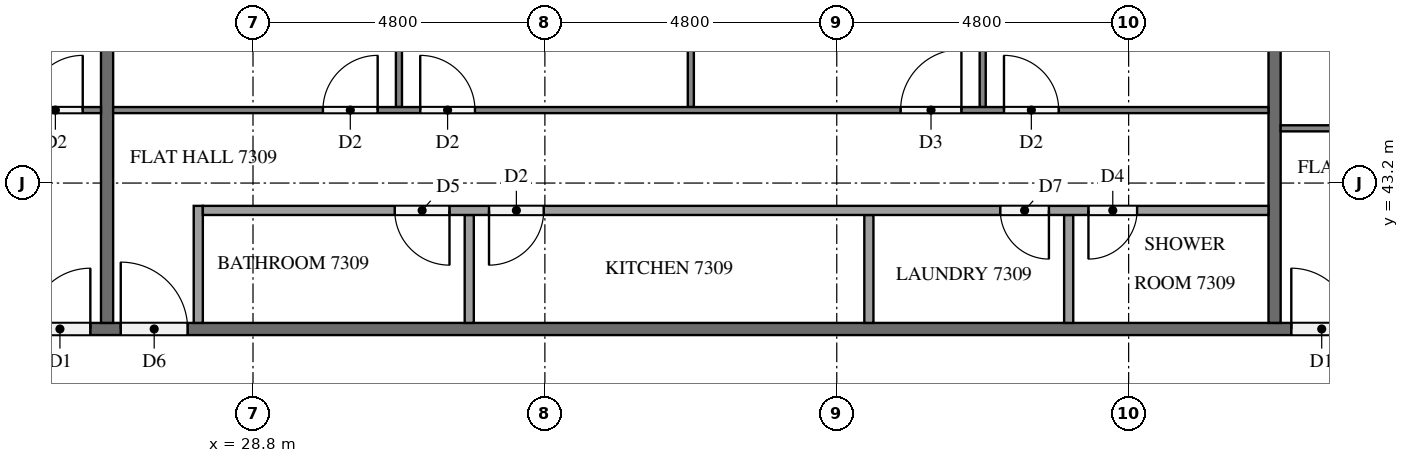
"""IFC4 building model, lengths in metres.
Left out: names, types, materials, properties, quantities, classifications, styles, units other than length and angle.
Written with IfcOpenShell. Run it as: python <this file> out.ifc"""

import sys

from ifc_helpers import new_model, si_unit, direction, frame, frame_2d, origin, place, context, subcontext, project, spatial, rectangle, extrude, element, fill, save


model = new_model("IFC4")
c1 = context("Model", 3, precision=1e-05, world=origin(), true_north=direction((0.0, 1.0)))
c2 = subcontext(c1, "Body", "Model", "MODEL_VIEW")
j1 = project(units=[si_unit("LENGTHUNIT", "METRE"), si_unit("PLANEANGLEUNIT", "RADIAN")], contexts=[c1])
p1 = place(None, origin())
s1 = spatial("IfcSite", under=j1, at=p1, CompositionType="ELEMENT")
p2 = place(p1, origin())
s2 = spatial("IfcBuilding", under=s1, at=p2, CompositionType="ELEMENT")
p3 = place(p2, frame((0.0, 0.0, 279.1)))
s3 = spatial("IfcBuildingStorey", under=s2, at=p3, CompositionType="ELEMENT", Elevation=279.1)
p4 = place(p3, frame((11.9, 40.8, 0.0), z_axis=(0.0, 0.0, 1.0), x_axis=(1.0, 0.0, 0.0)))
e1 = element("IfcWall", 1, at=p4, inside=s3, PredefinedType="PARTITIONING", context=c2, shape_type="SweptSolid", body=[
    extrude(rectangle(XDim=38.6, YDim=0.2, at=frame_2d((19.3, 0.0))), origin(), (0.0, 0.0, 1.0), 3.2),
])
p5 = place(p4, frame((33.975, 0.0, 0.0)))
e2 = element("IfcOpeningElement", 2, at=p5, cuts=e1, PredefinedType="OPENING", context=c2, shape_type="SweptSolid", body=[
    extrude(rectangle(XDim=1.0, YDim=2.1, at=frame_2d((0.5, 1.05))), frame((0.0, 0.11, 0.0), z_axis=(0.0, -1.0, 0.0), x_axis=(1.0, 0.0, 0.0)), (0.0, 0.0, 1.0), 0.22),
])
p6 = place(p4, frame((14.725, 0.0, 0.0)))
e3 = element("IfcOpeningElement", 3, at=p6, cuts=e1, PredefinedType="OPENING", context=c2, shape_type="SweptSolid", body=[
    extrude(rectangle(XDim=1.1, YDim=2.1, at=frame_2d((0.55, 1.05))), frame((0.0, 0.11, 0.0), z_axis=(0.0, -1.0, 0.0), x_axis=(1.0, 0.0, 0.0)), (0.0, 0.0, 1.0), 0.22),
])
p7 = place(p4, frame((13.225, 0.0, 0.0)))
e4 = element("IfcOpeningElement", 4, at=p7, cuts=e1, PredefinedType="OPENING", context=c2, shape_type="SweptSolid", body=[
    extrude(rectangle(XDim=1.0, YDim=2.1, at=frame_2d((0.5, 1.05))), frame((0.0, 0.11, 0.0), z_axis=(0.0, -1.0, 0.0), x_axis=(1.0, 0.0, 0.0)), (0.0, 0.0, 1.0), 0.22),
])
p8 = place(p4, frame((1.225, 0.0, 0.0)))
e5 = element("IfcOpeningElement", 5, at=p8, cuts=e1, PredefinedType="OPENING", context=c2, shape_type="SweptSolid", body=[
    extrude(rectangle(XDim=1.0, YDim=2.1, at=frame_2d((0.5, 1.05))), frame((0.0, 0.11, 0.0), z_axis=(0.0, -1.0, 0.0), x_axis=(1.0, 0.0, 0.0)), (0.0, 0.0, 1.0), 0.22),
])
for number, where, z_axis, x_axis in (
    (6, (45.6, 47.9, 0.0), (0.0, 0.0, 1.0), (0.0, -1.0, 0.0)),
    (7, (26.4, 47.9, 0.0), (0.0, 0.0, 1.0), (0.0, -1.0, 0.0)),
):
    element("IfcWall", number, at=place(p3, frame(where, z_axis=z_axis, x_axis=x_axis)), inside=s3, PredefinedType="PARTITIONING", context=c2, shape_type="SweptSolid", body=[
        extrude(rectangle(XDim=7.0, YDim=0.2, at=frame_2d((3.5, 0.0))), origin(), (0.0, 0.0, 1.0), 3.2),
    ])
p9 = place(p3, frame((45.7, 44.1, 0.0), z_axis=(0.0, 0.0, 1.0), x_axis=(1.0, 0.0, 0.0)))
e8 = element("IfcWall", 8, at=p9, inside=s3, PredefinedType="PARTITIONING", context=c2, shape_type="SweptSolid", body=[
    extrude(rectangle(XDim=11.559, YDim=0.1, at=frame_2d((5.779, 0.0))), origin(), (0.0, 0.0, 1.0), 3.2),
])
p10 = place(p9, frame((3.45, 0.0, 0.0)))
e9 = element("IfcOpeningElement", 9, at=p10, cuts=e8, PredefinedType="OPENING", context=c2, shape_type="SweptSolid", body=[
    extrude(rectangle(XDim=0.9, YDim=2.1, at=frame_2d((0.45, 1.05))), frame((0.0, 0.06, 0.0), z_axis=(0.0, -1.0, 0.0), x_axis=(1.0, 0.0, 0.0)), (0.0, 0.0, 1.0), 0.12),
])
p11 = place(p9, frame((5.05, 0.0, 0.0)))
e10 = element("IfcOpeningElement", 10, at=p11, cuts=e8, PredefinedType="OPENING", context=c2, shape_type="SweptSolid", body=[
    extrude(rectangle(XDim=1.0, YDim=2.1, at=frame_2d((0.5, 1.05))), frame((0.0, 0.06, 0.0), z_axis=(0.0, -1.0, 0.0), x_axis=(1.0, 0.0, 0.0)), (0.0, 0.0, 1.0), 0.12),
])
for number, where, z_axis, x_axis in (
    (11, (31.2, 44.45, 0.0), (0.0, 0.0, 1.0), (0.0, 1.0, 0.0)),
    (12, (36.0, 44.45, 0.0), (0.0, 0.0, 1.0), (0.0, 1.0, 0.0)),
    (13, (40.8, 44.45, 0.0), (0.0, 0.0, 1.0), (0.0, 1.0, 0.0)),
):
    element("IfcWall", number, at=place(p3, frame(where, z_axis=z_axis, x_axis=x_axis)), inside=s3, PredefinedType="PARTITIONING", context=c2, shape_type="SweptSolid", body=[
        extrude(rectangle(XDim=3.45, YDim=0.1, at=frame_2d((1.725, 0.0))), origin(), (0.0, 0.0, 1.0), 3.2),
    ])
p12 = place(p3, frame((26.5, 44.4, 0.0), z_axis=(0.0, 0.0, 1.0), x_axis=(1.0, 0.0, 0.0)))
e14 = element("IfcWall", 14, at=p12, inside=s3, PredefinedType="PARTITIONING", context=c2, shape_type="SweptSolid", body=[
    extrude(rectangle(XDim=19.0, YDim=0.1, at=frame_2d((9.5, 0.0))), origin(), (0.0, 0.0, 1.0), 3.2),
])
p13 = place(p12, frame((3.45, 0.0, 0.0)))
e15 = element("IfcOpeningElement", 15, at=p13, cuts=e14, PredefinedType="OPENING", context=c2, shape_type="SweptSolid", body=[
    extrude(rectangle(XDim=0.9, YDim=2.1, at=frame_2d((0.45, 1.05))), frame((0.0, 0.06, 0.0), z_axis=(0.0, -1.0, 0.0), x_axis=(1.0, 0.0, 0.0)), (0.0, 0.0, 1.0), 0.12),
])
p14 = place(p12, frame((5.05, 0.0, 0.0)))
e16 = element("IfcOpeningElement", 16, at=p14, cuts=e14, PredefinedType="OPENING", context=c2, shape_type="SweptSolid", body=[
    extrude(rectangle(XDim=0.9, YDim=2.1, at=frame_2d((0.45, 1.05))), frame((0.0, 0.06, 0.0), z_axis=(0.0, -1.0, 0.0), x_axis=(1.0, 0.0, 0.0)), (0.0, 0.0, 1.0), 0.12),
])
p15 = place(p12, frame((12.95, 0.0, 0.0)))
e17 = element("IfcOpeningElement", 17, at=p15, cuts=e14, PredefinedType="OPENING", context=c2, shape_type="SweptSolid", body=[
    extrude(rectangle(XDim=1.0, YDim=2.1, at=frame_2d((0.5, 1.05))), frame((0.0, 0.06, 0.0), z_axis=(0.0, -1.0, 0.0), x_axis=(1.0, 0.0, 0.0)), (0.0, 0.0, 1.0), 0.12),
])
p16 = place(p12, frame((14.65, 0.0, 0.0)))
e18 = element("IfcOpeningElement", 18, at=p16, cuts=e14, PredefinedType="OPENING", context=c2, shape_type="SweptSolid", body=[
    extrude(rectangle(XDim=0.9, YDim=2.1, at=frame_2d((0.45, 1.05))), frame((0.0, 0.06, 0.0), z_axis=(0.0, -1.0, 0.0), x_axis=(1.0, 0.0, 0.0)), (0.0, 0.0, 1.0), 0.12),
])
for number, where, z_axis, x_axis in (
    (19, (32.356, 40.9, 0.0), (0.0, 0.0, 1.0), (0.0, 1.0, 0.0)),
    (20, (38.928, 40.9, 0.0), (0.0, 0.0, 1.0), (0.0, 1.0, 0.0)),
    (21, (42.214, 40.9, 0.0), (0.0, 0.0, 1.0), (0.0, 1.0, 0.0)),
):
    element("IfcWall", number, at=place(p3, frame(where, z_axis=z_axis, x_axis=x_axis)), inside=s3, PredefinedType="PARTITIONING", context=c2, shape_type="SweptSolid", body=[
        extrude(rectangle(XDim=1.775, YDim=0.15, at=frame_2d((0.888, 0.0))), origin(), (0.0, 0.0, 1.0), 3.2),
    ])
p17 = place(p3, frame((27.9, 40.9, 0.0), z_axis=(0.0, 0.0, 1.0), x_axis=(0.0, 1.0, 0.0)))
e22 = element("IfcWall", 22, at=p17, inside=s3, PredefinedType="PARTITIONING", context=c2, shape_type="SweptSolid", body=[
    extrude(rectangle(XDim=1.925, YDim=0.15, at=frame_2d((0.962, 0.0))), origin(), (0.0, 0.0, 1.0), 3.2),
])
p18 = place(p3, frame((45.5, 42.75, 0.0), z_axis=(0.0, 0.0, 1.0), x_axis=(-1.0, 0.0, 0.0)))
e23 = element("IfcWall", 23, at=p18, inside=s3, PredefinedType="PARTITIONING", context=c2, shape_type="SweptSolid", body=[
    extrude(rectangle(XDim=17.525, YDim=0.15, at=frame_2d((8.762, 0.0))), origin(), (0.0, 0.0, 1.0), 3.2),
])
p19 = place(p18, frame((13.469, 0.0, 0.0)))
e24 = element("IfcOpeningElement", 24, at=p19, cuts=e23, PredefinedType="OPENING", context=c2, shape_type="SweptSolid", body=[
    extrude(rectangle(XDim=0.9, YDim=2.1, at=frame_2d((0.45, 1.05))), frame((0.0, 0.085, 0.0), z_axis=(0.0, -1.0, 0.0), x_axis=(1.0, 0.0, 0.0)), (0.0, 0.0, 1.0), 0.17),
])
p20 = place(p18, frame((11.919, 0.0, 0.0)))
e25 = element("IfcOpeningElement", 25, at=p20, cuts=e23, PredefinedType="OPENING", context=c2, shape_type="SweptSolid", body=[
    extrude(rectangle(XDim=0.9, YDim=2.1, at=frame_2d((0.45, 1.05))), frame((0.0, 0.085, 0.0), z_axis=(0.0, -1.0, 0.0), x_axis=(1.0, 0.0, 0.0)), (0.0, 0.0, 1.0), 0.17),
])
p21 = place(p18, frame((3.611, 0.0, 0.0)))
e26 = element("IfcOpeningElement", 26, at=p21, cuts=e23, PredefinedType="OPENING", context=c2, shape_type="SweptSolid", body=[
    extrude(rectangle(XDim=0.8, YDim=2.1, at=frame_2d((0.4, 1.05))), frame((0.0, 0.085, 0.0), z_axis=(0.0, -1.0, 0.0), x_axis=(1.0, 0.0, 0.0)), (0.0, 0.0, 1.0), 0.17),
])
p22 = place(p18, frame((2.161, 0.0, 0.0)))
e27 = element("IfcOpeningElement", 27, at=p22, cuts=e23, PredefinedType="OPENING", context=c2, shape_type="SweptSolid", body=[
    extrude(rectangle(XDim=0.8, YDim=2.1, at=frame_2d((0.4, 1.05))), frame((0.0, 0.085, 0.0), z_axis=(0.0, -1.0, 0.0), x_axis=(1.0, 0.0, 0.0)), (0.0, 0.0, 1.0), 0.17),
])
p23 = place(p3, frame((14.5, 44.4, 0.0), z_axis=(0.0, 0.0, 1.0), x_axis=(1.0, 0.0, 0.0)))
e28 = element("IfcWall", 28, at=p23, inside=s3, PredefinedType="PARTITIONING", context=c2, shape_type="SweptSolid", body=[
    extrude(rectangle(XDim=11.8, YDim=0.1, at=frame_2d((5.9, 0.0))), origin(), (0.0, 0.0, 1.0), 3.2),
])
p24 = place(p23, frame((10.6, 0.0, 0.0)))
e29 = element("IfcOpeningElement", 29, at=p24, cuts=e28, PredefinedType="OPENING", context=c2, shape_type="SweptSolid", body=[
    extrude(rectangle(XDim=0.9, YDim=2.1, at=frame_2d((0.45, 1.05))), frame((0.0, 0.06, 0.0), z_axis=(0.0, -1.0, 0.0), x_axis=(1.0, 0.0, 0.0)), (0.0, 0.0, 1.0), 0.12),
])
p25 = place(p23, frame((0.3, 0.0, 0.0)))
e30 = element("IfcOpeningElement", 30, at=p25, cuts=e28, PredefinedType="OPENING", context=c2, shape_type="SweptSolid", body=[
    extrude(rectangle(XDim=1.0, YDim=2.1, at=frame_2d((0.5, 1.05))), frame((0.0, 0.06, 0.0), z_axis=(0.0, -1.0, 0.0), x_axis=(1.0, 0.0, 0.0)), (0.0, 0.0, 1.0), 0.12),
])
p26 = place(p5, origin())
e31 = element("IfcDoor", 31, at=p26, inside=s3, OperationType="SINGLE_SWING_LEFT", PredefinedType="DOOR", context=c2, shape_type="SweptSolid", body=[
    extrude(rectangle(XDim=1.0, YDim=2.1, at=frame_2d((0.5, 1.05))), frame((0.0, 0.025, 0.0), z_axis=(0.0, -1.0, 0.0), x_axis=(1.0, 0.0, 0.0)), (0.0, 0.0, 1.0), 0.05),
])
fill(e2, e31)
p27 = place(p6, origin())
e32 = element("IfcDoor", 32, at=p27, inside=s3, OperationType="SINGLE_SWING_LEFT", PredefinedType="DOOR", context=c2, shape_type="SweptSolid", body=[
    extrude(rectangle(XDim=1.1, YDim=2.1, at=frame_2d((0.55, 1.05))), frame((0.0, 0.025, 0.0), z_axis=(0.0, -1.0, 0.0), x_axis=(1.0, 0.0, 0.0)), (0.0, 0.0, 1.0), 0.05),
])
fill(e3, e32)
p28 = place(p7, origin())
e33 = element("IfcDoor", 33, at=p28, inside=s3, OperationType="SINGLE_SWING_RIGHT", PredefinedType="DOOR", context=c2, shape_type="SweptSolid", body=[
    extrude(rectangle(XDim=1.0, YDim=2.1, at=frame_2d((0.5, 1.05))), frame((0.0, 0.025, 0.0), z_axis=(0.0, -1.0, 0.0), x_axis=(1.0, 0.0, 0.0)), (0.0, 0.0, 1.0), 0.05),
])
fill(e4, e33)
p29 = place(p13, origin())
e34 = element("IfcDoor", 34, at=p29, inside=s3, OperationType="SINGLE_SWING_RIGHT", PredefinedType="DOOR", context=c2, shape_type="SweptSolid", body=[
    extrude(rectangle(XDim=0.9, YDim=2.1, at=frame_2d((0.45, 1.05))), frame((0.0, 0.025, 0.0), z_axis=(0.0, -1.0, 0.0), x_axis=(1.0, 0.0, 0.0)), (0.0, 0.0, 1.0), 0.05),
])
fill(e15, e34)
p30 = place(p14, origin())
e35 = element("IfcDoor", 35, at=p30, inside=s3, OperationType="SINGLE_SWING_LEFT", PredefinedType="DOOR", context=c2, shape_type="SweptSolid", body=[
    extrude(rectangle(XDim=0.9, YDim=2.1, at=frame_2d((0.45, 1.05))), frame((0.0, 0.025, 0.0), z_axis=(0.0, -1.0, 0.0), x_axis=(1.0, 0.0, 0.0)), (0.0, 0.0, 1.0), 0.05),
])
fill(e16, e35)
p31 = place(p15, origin())
e36 = element("IfcDoor", 36, at=p31, inside=s3, OperationType="SINGLE_SWING_RIGHT", PredefinedType="DOOR", context=c2, shape_type="SweptSolid", body=[
    extrude(rectangle(XDim=1.0, YDim=2.1, at=frame_2d((0.5, 1.05))), frame((0.0, 0.025, 0.0), z_axis=(0.0, -1.0, 0.0), x_axis=(1.0, 0.0, 0.0)), (0.0, 0.0, 1.0), 0.05),
])
fill(e17, e36)
p32 = place(p16, origin())
e37 = element("IfcDoor", 37, at=p32, inside=s3, OperationType="SINGLE_SWING_LEFT", PredefinedType="DOOR", context=c2, shape_type="SweptSolid", body=[
    extrude(rectangle(XDim=0.9, YDim=2.1, at=frame_2d((0.45, 1.05))), frame((0.0, 0.025, 0.0), z_axis=(0.0, -1.0, 0.0), x_axis=(1.0, 0.0, 0.0)), (0.0, 0.0, 1.0), 0.05),
])
fill(e18, e37)
p33 = place(p19, origin())
e38 = element("IfcDoor", 38, at=p33, inside=s3, OperationType="SINGLE_SWING_LEFT", PredefinedType="DOOR", context=c2, shape_type="SweptSolid", body=[
    extrude(rectangle(XDim=0.9, YDim=2.1, at=frame_2d((0.45, 1.05))), frame((0.0, 0.025, 0.0), z_axis=(0.0, -1.0, 0.0), x_axis=(1.0, 0.0, 0.0)), (0.0, 0.0, 1.0), 0.05),
])
fill(e24, e38)
p34 = place(p20, origin())
e39 = element("IfcDoor", 39, at=p34, inside=s3, OperationType="SINGLE_SWING_RIGHT", PredefinedType="DOOR", context=c2, shape_type="SweptSolid", body=[
    extrude(rectangle(XDim=0.9, YDim=2.1, at=frame_2d((0.45, 1.05))), frame((0.0, 0.025, 0.0), z_axis=(0.0, -1.0, 0.0), x_axis=(1.0, 0.0, 0.0)), (0.0, 0.0, 1.0), 0.05),
])
fill(e25, e39)
p35 = place(p21, origin())
e40 = element("IfcDoor", 40, at=p35, inside=s3, OperationType="SINGLE_SWING_LEFT", PredefinedType="DOOR", context=c2, shape_type="SweptSolid", body=[
    extrude(rectangle(XDim=0.8, YDim=2.1, at=frame_2d((0.4, 1.05))), frame((0.0, 0.025, 0.0), z_axis=(0.0, -1.0, 0.0), x_axis=(1.0, 0.0, 0.0)), (0.0, 0.0, 1.0), 0.05),
])
fill(e26, e40)
p36 = place(p22, origin())
e41 = element("IfcDoor", 41, at=p36, inside=s3, OperationType="SINGLE_SWING_RIGHT", PredefinedType="DOOR", context=c2, shape_type="SweptSolid", body=[
    extrude(rectangle(XDim=0.8, YDim=2.1, at=frame_2d((0.4, 1.05))), frame((0.0, 0.025, 0.0), z_axis=(0.0, -1.0, 0.0), x_axis=(1.0, 0.0, 0.0)), (0.0, 0.0, 1.0), 0.05),
])
fill(e27, e41)
p37 = place(p24, origin())
e42 = element("IfcDoor", 42, at=p37, inside=s3, OperationType="SINGLE_SWING_RIGHT", PredefinedType="DOOR", context=c2, shape_type="SweptSolid", body=[
    extrude(rectangle(XDim=0.9, YDim=2.1, at=frame_2d((0.45, 1.05))), frame((0.0, 0.025, 0.0), z_axis=(0.0, -1.0, 0.0), x_axis=(1.0, 0.0, 0.0)), (0.0, 0.0, 1.0), 0.05),
])
fill(e29, e42)
save(model, sys.argv[1])
